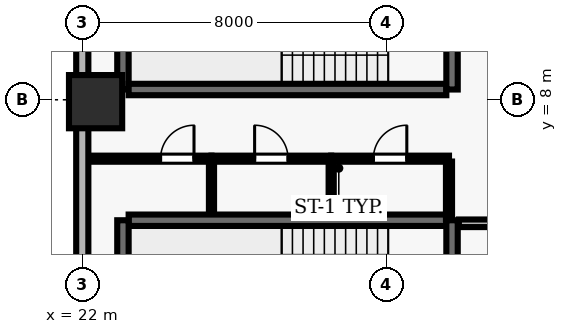
"""IFC4 building model, lengths in metres.
Left out: names, types, materials, properties, quantities, classifications, styles, units other than length and angle.
Written with IfcOpenShell. Run it as: python <this file> out.ifc"""

import sys

from ifc_helpers import new_model, si_unit, direction, frame, frame_2d, origin, origin_2d, place, context, subcontext, project, spatial, rectangle, extrude, element, fill, save


model = new_model("IFC4")
c1 = context("Model", 3, precision=1e-05, world=origin(), true_north=direction((0.0, 1.0)))
c2 = subcontext(c1, "Body", "Model", "MODEL_VIEW")
j1 = project(units=[si_unit("LENGTHUNIT", "METRE"), si_unit("PLANEANGLEUNIT", "RADIAN")], contexts=[c1])
p1 = place(None, origin())
s1 = spatial("IfcSite", under=j1, at=p1, CompositionType="ELEMENT")
p2 = place(p1, origin())
s2 = spatial("IfcBuilding", under=s1, at=p2, CompositionType="ELEMENT")
p3 = place(p2, frame((0.0, 0.0, 34.9)))
s3 = spatial("IfcBuildingStorey", under=s2, at=p3, CompositionType="ELEMENT", Elevation=34.9)
p4 = place(p3, frame((22.35, 7.95, 0.0), z_axis=(0.0, 0.0, 1.0), x_axis=(1.0, 0.0, 0.0)))
e1 = element("IfcColumn", 1, at=p4, inside=s3, PredefinedType="COLUMN", context=c2, shape_type="SweptSolid", body=[
    extrude(rectangle(XDim=1.4, YDim=1.4, at=origin_2d()), origin(), (0.0, 0.0, 1.0), 3.9),
])
p5 = place(p3, frame((22.0, 51.5, 0.0), z_axis=(0.0, 0.0, 1.0), x_axis=(0.0, -1.0, 0.0)))
e2 = element("IfcWall", 2, at=p5, inside=s3, PredefinedType="SOLIDWALL", context=c2, shape_type="SweptSolid", body=[
    extrude(rectangle(XDim=49.0, YDim=0.32, at=frame_2d((24.5, 0.0))), origin(), (0.0, 0.0, 1.0), 3.69),
])
p6 = place(p5, frame((12.1, 0.0, 0.0)))
e3 = element("IfcOpeningElement", 3, at=p6, cuts=e2, PredefinedType="OPENING", context=c2, shape_type="SweptSolid", body=[
    extrude(rectangle(XDim=1.0, YDim=2.2, at=frame_2d((0.5, 1.1))), frame((0.0, 0.17, 0.0), z_axis=(0.0, -1.0, 0.0), x_axis=(1.0, 0.0, 0.0)), (0.0, 0.0, 1.0), 0.34),
])
p7 = place(p5, frame((1.522, 0.0, 0.9)))
e4 = element("IfcOpeningElement", 4, at=p7, cuts=e2, PredefinedType="OPENING", context=c2, shape_type="SweptSolid", body=[
    extrude(rectangle(XDim=2.4, YDim=1.8, at=frame_2d((1.2, 0.9))), frame((0.0, 0.17, 0.0), z_axis=(0.0, -1.0, 0.0), x_axis=(1.0, 0.0, 0.0)), (0.0, 0.0, 1.0), 0.34),
])
p8 = place(p5, frame((17.856, 0.0, 0.9)))
e5 = element("IfcOpeningElement", 5, at=p8, cuts=e2, PredefinedType="OPENING", context=c2, shape_type="SweptSolid", body=[
    extrude(rectangle(XDim=2.4, YDim=1.8, at=frame_2d((1.2, 0.9))), frame((0.0, 0.17, 0.0), z_axis=(0.0, -1.0, 0.0), x_axis=(1.0, 0.0, 0.0)), (0.0, 0.0, 1.0), 0.34),
])
p9 = place(p5, frame((22.4, 0.0, 0.9)))
e6 = element("IfcOpeningElement", 6, at=p9, cuts=e2, PredefinedType="OPENING", context=c2, shape_type="SweptSolid", body=[
    extrude(rectangle(XDim=2.4, YDim=1.8, at=frame_2d((1.2, 0.9))), frame((0.0, 0.17, 0.0), z_axis=(0.0, -1.0, 0.0), x_axis=(1.0, 0.0, 0.0)), (0.0, 0.0, 1.0), 0.34),
])
p10 = place(p5, frame((29.194, 0.0, 0.9)))
e7 = element("IfcOpeningElement", 7, at=p10, cuts=e2, PredefinedType="OPENING", context=c2, shape_type="SweptSolid", body=[
    extrude(rectangle(XDim=2.4, YDim=1.8, at=frame_2d((1.2, 0.9))), frame((0.0, 0.17, 0.0), z_axis=(0.0, -1.0, 0.0), x_axis=(1.0, 0.0, 0.0)), (0.0, 0.0, 1.0), 0.34),
])
p11 = place(p5, frame((33.289, 0.0, 0.9)))
e8 = element("IfcOpeningElement", 8, at=p11, cuts=e2, PredefinedType="OPENING", context=c2, shape_type="SweptSolid", body=[
    extrude(rectangle(XDim=2.4, YDim=1.8, at=frame_2d((1.2, 0.9))), frame((0.0, 0.17, 0.0), z_axis=(0.0, -1.0, 0.0), x_axis=(1.0, 0.0, 0.0)), (0.0, 0.0, 1.0), 0.34),
])
p12 = place(p5, frame((39.633, 0.0, 0.9)))
e9 = element("IfcOpeningElement", 9, at=p12, cuts=e2, PredefinedType="OPENING", context=c2, shape_type="SweptSolid", body=[
    extrude(rectangle(XDim=2.4, YDim=1.8, at=frame_2d((1.2, 0.9))), frame((0.0, 0.17, 0.0), z_axis=(0.0, -1.0, 0.0), x_axis=(1.0, 0.0, 0.0)), (0.0, 0.0, 1.0), 0.34),
])
p13 = place(p3, frame((31.58, 4.83, 0.0), z_axis=(0.0, 0.0, 1.0), x_axis=(-1.0, 0.0, 0.0)))
e10 = element("IfcWall", 10, at=p13, inside=s3, PredefinedType="SHEAR", context=c2, shape_type="SweptSolid", body=[
    extrude(rectangle(XDim=8.36, YDim=0.3, at=frame_2d((4.18, 0.0))), origin(), (0.0, 0.0, 1.0), 3.69),
])
p14 = place(p3, frame((23.07, 4.83, 0.0), z_axis=(0.0, 0.0, 1.0), x_axis=(0.0, -1.0, 0.0)))
e11 = element("IfcWall", 11, at=p14, inside=s3, PredefinedType="SHEAR", context=c2, shape_type="SweptSolid", body=[
    extrude(rectangle(XDim=3.51, YDim=0.3, at=frame_2d((1.755, 0.0))), origin(), (0.0, 0.0, 1.0), 3.69),
])
p15 = place(p3, frame((31.73, 0.96, 0.0), z_axis=(0.0, 0.0, 1.0), x_axis=(0.0, 1.0, 0.0)))
e12 = element("IfcWall", 12, at=p15, inside=s3, PredefinedType="SHEAR", context=c2, shape_type="SweptSolid", body=[
    extrude(rectangle(XDim=3.87, YDim=0.3, at=frame_2d((1.935, 0.0))), origin(), (0.0, 0.0, 1.0), 3.69),
])
p16 = place(p15, frame((1.54, 0.0, 0.0)))
e13 = element("IfcOpeningElement", 13, at=p16, cuts=e12, PredefinedType="OPENING", context=c2, shape_type="SweptSolid", body=[
    extrude(rectangle(XDim=1.15, YDim=2.15, at=frame_2d((0.575, 1.075))), frame((0.0, 0.16, 0.0), z_axis=(0.0, -1.0, 0.0), x_axis=(1.0, 0.0, 0.0)), (0.0, 0.0, 1.0), 0.32),
])
p17 = place(p3, frame((23.07, 11.78, 0.0), z_axis=(0.0, 0.0, 1.0), x_axis=(0.0, -1.0, 0.0)))
e14 = element("IfcWall", 14, at=p17, inside=s3, PredefinedType="SHEAR", context=c2, shape_type="SweptSolid", body=[
    extrude(rectangle(XDim=3.51, YDim=0.3, at=frame_2d((1.755, 0.0))), origin(), (0.0, 0.0, 1.0), 3.69),
])
p18 = place(p3, frame((23.22, 8.27, 0.0), z_axis=(0.0, 0.0, 1.0), x_axis=(1.0, 0.0, 0.0)))
e15 = element("IfcWall", 15, at=p18, inside=s3, PredefinedType="SHEAR", context=c2, shape_type="SweptSolid", body=[
    extrude(rectangle(XDim=8.36, YDim=0.3, at=frame_2d((4.18, 0.0))), origin(), (0.0, 0.0, 1.0), 3.69),
])
p19 = place(p3, frame((31.73, 8.27, 0.0), z_axis=(0.0, 0.0, 1.0), x_axis=(0.0, 1.0, 0.0)))
e16 = element("IfcWall", 16, at=p19, inside=s3, PredefinedType="SHEAR", context=c2, shape_type="SweptSolid", body=[
    extrude(rectangle(XDim=3.51, YDim=0.3, at=frame_2d((1.755, 0.0))), origin(), (0.0, 0.0, 1.0), 3.69),
])
p20 = place(p19, frame((1.18, 0.0, 0.0)))
e17 = element("IfcOpeningElement", 17, at=p20, cuts=e16, PredefinedType="OPENING", context=c2, shape_type="SweptSolid", body=[
    extrude(rectangle(XDim=1.15, YDim=2.15, at=frame_2d((0.575, 1.075))), frame((0.0, 0.16, 0.0), z_axis=(0.0, -1.0, 0.0), x_axis=(1.0, 0.0, 0.0)), (0.0, 0.0, 1.0), 0.32),
])
p21 = place(p3, frame((22.2, 6.45, 0.0), z_axis=(0.0, 0.0, 1.0), x_axis=(1.0, 0.0, 0.0)))
e18 = element("IfcWall", 18, at=p21, inside=s3, PredefinedType="PARTITIONING", context=c2, shape_type="SweptSolid", body=[
    extrude(rectangle(XDim=3.2, YDim=0.16, at=frame_2d((1.6, 0.0))), origin(), (0.0, 0.0, 1.0), 3.69),
])
p22 = place(p21, frame((1.86, 0.0, 0.0)))
e19 = element("IfcOpeningElement", 19, at=p22, cuts=e18, PredefinedType="OPENING", context=c2, shape_type="SweptSolid", body=[
    extrude(rectangle(XDim=0.88, YDim=2.1, at=frame_2d((0.44, 1.05))), frame((0.0, 0.09, 0.0), z_axis=(0.0, -1.0, 0.0), x_axis=(1.0, 0.0, 0.0)), (0.0, 0.0, 1.0), 0.18),
])
p23 = place(p3, frame((25.4, 6.45, 0.0), z_axis=(0.0, 0.0, 1.0), x_axis=(1.0, 0.0, 0.0)))
e20 = element("IfcWall", 20, at=p23, inside=s3, PredefinedType="PARTITIONING", context=c2, shape_type="SweptSolid", body=[
    extrude(rectangle(XDim=3.15, YDim=0.16, at=frame_2d((1.575, 0.0))), origin(), (0.0, 0.0, 1.0), 3.69),
])
p24 = place(p23, frame((1.135, 0.0, 0.0)))
e21 = element("IfcOpeningElement", 21, at=p24, cuts=e20, PredefinedType="OPENING", context=c2, shape_type="SweptSolid", body=[
    extrude(rectangle(XDim=0.88, YDim=2.1, at=frame_2d((0.44, 1.05))), frame((0.0, 0.09, 0.0), z_axis=(0.0, -1.0, 0.0), x_axis=(1.0, 0.0, 0.0)), (0.0, 0.0, 1.0), 0.18),
])
p25 = place(p3, frame((28.55, 6.45, 0.0), z_axis=(0.0, 0.0, 1.0), x_axis=(1.0, 0.0, 0.0)))
e22 = element("IfcWall", 22, at=p25, inside=s3, PredefinedType="PARTITIONING", context=c2, shape_type="SweptSolid", body=[
    extrude(rectangle(XDim=3.1, YDim=0.16, at=frame_2d((1.55, 0.0))), origin(), (0.0, 0.0, 1.0), 3.69),
])
p26 = place(p25, frame((1.11, 0.0, 0.0)))
e23 = element("IfcOpeningElement", 23, at=p26, cuts=e22, PredefinedType="OPENING", context=c2, shape_type="SweptSolid", body=[
    extrude(rectangle(XDim=0.88, YDim=2.1, at=frame_2d((0.44, 1.05))), frame((0.0, 0.09, 0.0), z_axis=(0.0, -1.0, 0.0), x_axis=(1.0, 0.0, 0.0)), (0.0, 0.0, 1.0), 0.18),
])
p27 = place(p3, frame((35.02, 4.75, 0.0), z_axis=(0.0, 0.0, 1.0), x_axis=(-1.0, 0.0, 0.0)))
e24 = element("IfcWall", 24, at=p27, inside=s3, PredefinedType="SOLIDWALL", context=c2, shape_type="SweptSolid", body=[
    extrude(rectangle(XDim=3.11, YDim=0.2, at=frame_2d((1.555, 0.0))), origin(), (0.0, 0.0, 1.0), 3.69),
])
p28 = place(p27, frame((1.03, 0.0, 0.0)))
e25 = element("IfcOpeningElement", 25, at=p28, cuts=e24, PredefinedType="OPENING", context=c2, shape_type="SweptSolid", body=[
    extrude(rectangle(XDim=1.05, YDim=2.15, at=frame_2d((0.525, 1.075))), frame((0.0, 0.11, 0.0), z_axis=(0.0, -1.0, 0.0), x_axis=(1.0, 0.0, 0.0)), (0.0, 0.0, 1.0), 0.22),
])
for number, where, z_axis, x_axis in (
    (26, (25.4, 5.01, 0.0), (0.0, 0.0, 1.0), (0.0, 1.0, 0.0)),
    (27, (28.55, 5.01, 0.0), (0.0, 0.0, 1.0), (0.0, 1.0, 0.0)),
):
    element("IfcWall", number, at=place(p3, frame(where, z_axis=z_axis, x_axis=x_axis)), inside=s3, PredefinedType="PARTITIONING", context=c2, shape_type="SweptSolid", body=[
        extrude(rectangle(XDim=1.365, YDim=0.135, at=frame_2d((0.683, 0.0))), origin(), (0.0, 0.0, 1.0), 3.69),
    ])
p29 = place(p3, frame((31.65, 4.86, 0.0), z_axis=(0.0, 0.0, 1.0), x_axis=(0.0, 1.0, 0.0)))
e28 = element("IfcWall", 28, at=p29, inside=s3, PredefinedType="PARTITIONING", context=c2, shape_type="SweptSolid", body=[
    extrude(rectangle(XDim=1.515, YDim=0.16, at=frame_2d((0.757, 0.0))), origin(), (0.0, 0.0, 1.0), 3.69),
])
p30 = place(p22, origin())
e29 = element("IfcDoor", 29, at=p30, inside=s3, OperationType="SINGLE_SWING_RIGHT", PredefinedType="DOOR", context=c2, shape_type="SweptSolid", body=[
    extrude(rectangle(XDim=0.88, YDim=2.1, at=frame_2d((0.44, 1.05))), frame((0.0, 0.025, 0.0), z_axis=(0.0, -1.0, 0.0), x_axis=(1.0, 0.0, 0.0)), (0.0, 0.0, 1.0), 0.05),
])
fill(e19, e29)
p31 = place(p24, origin())
e30 = element("IfcDoor", 30, at=p31, inside=s3, OperationType="SINGLE_SWING_LEFT", PredefinedType="DOOR", context=c2, shape_type="SweptSolid", body=[
    extrude(rectangle(XDim=0.88, YDim=2.1, at=frame_2d((0.44, 1.05))), frame((0.0, 0.025, 0.0), z_axis=(0.0, -1.0, 0.0), x_axis=(1.0, 0.0, 0.0)), (0.0, 0.0, 1.0), 0.05),
])
fill(e21, e30)
p32 = place(p26, origin())
e31 = element("IfcDoor", 31, at=p32, inside=s3, OperationType="SINGLE_SWING_RIGHT", PredefinedType="DOOR", context=c2, shape_type="SweptSolid", body=[
    extrude(rectangle(XDim=0.88, YDim=2.1, at=frame_2d((0.44, 1.05))), frame((0.0, 0.025, 0.0), z_axis=(0.0, -1.0, 0.0), x_axis=(1.0, 0.0, 0.0)), (0.0, 0.0, 1.0), 0.05),
])
fill(e23, e31)
save(model, sys.argv[1])
